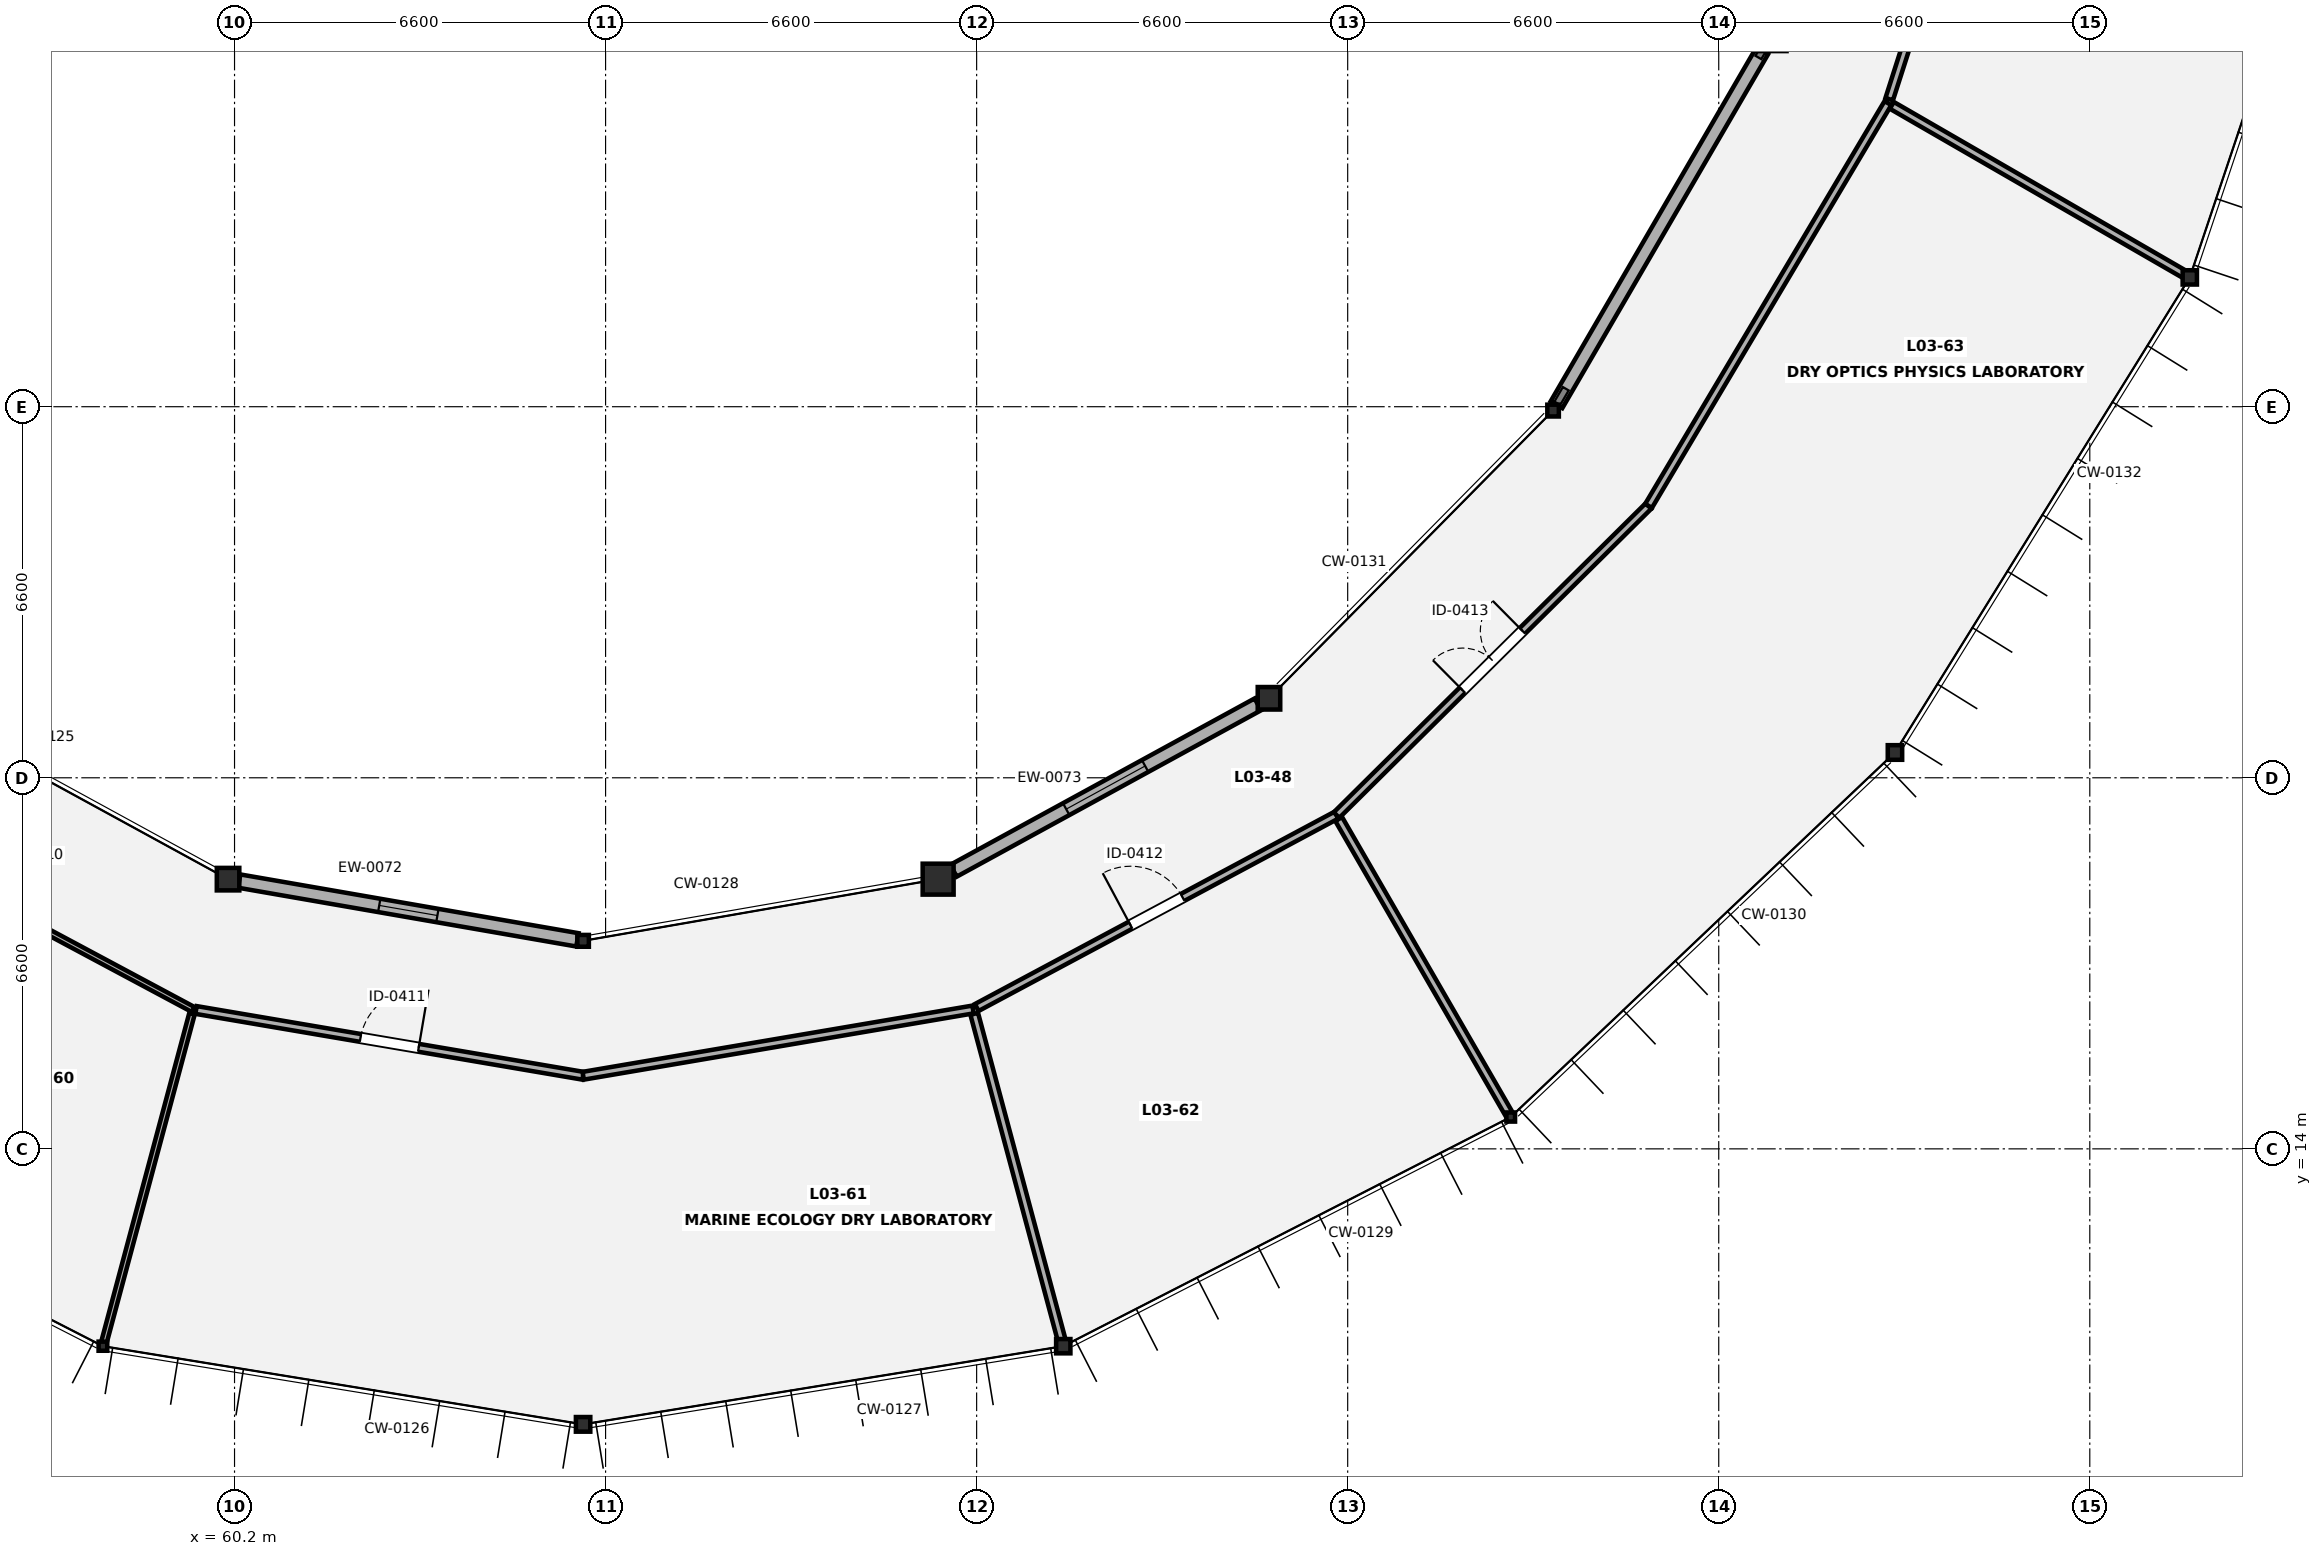
"""IFC4 building model, lengths in metres.
Left out: names, types, materials, properties, quantities, classifications, styles, units other than length and angle.
Written with IfcOpenShell. Run it as: python <this file> out.ifc"""

import sys

from ifc_helpers import new_model, si_unit, direction, frame, frame_2d, origin, origin_2d, place, context, subcontext, project, spatial, rectangle, i_section, extrude, element, fill, save


model = new_model("IFC4")
c1 = context("Model", 3, precision=1e-05, world=origin(), true_north=direction((0.0, 1.0)))
c2 = subcontext(c1, "Body", "Model", "MODEL_VIEW")
j1 = project(units=[si_unit("LENGTHUNIT", "METRE"), si_unit("PLANEANGLEUNIT", "RADIAN")], contexts=[c1])
p1 = place(None, origin())
s1 = spatial("IfcSite", under=j1, at=p1, CompositionType="ELEMENT")
p2 = place(p1, origin())
s2 = spatial("IfcBuilding", under=s1, at=p2, CompositionType="ELEMENT")
p3 = place(p2, frame((0.0, 0.0, 13.3)))
s3 = spatial("IfcBuildingStorey", under=s2, at=p3, CompositionType="ELEMENT", Elevation=13.3)
p4 = place(p3, frame((57.859, 10.49, 0.0), z_axis=(0.0, 0.0, 1.0), x_axis=(1.0, 0.0, 0.0)))
e1 = element("IfcColumn", 1, at=p4, inside=s3, PredefinedType="COLUMN", context=c2, shape_type="SweptSolid", body=[
    extrude(i_section(OverallWidth=0.154, OverallDepth=0.162, WebThickness=0.008, FlangeThickness=0.011, FilletRadius=0.009, at=origin_2d()), origin(), (0.0, 0.0, 1.0), 4.2),
])
p5 = place(p3, frame((60.085, 18.797, 0.0), z_axis=(0.0, 0.0, 1.0), x_axis=(1.0, 0.0, 0.0)))
e2 = element("IfcColumn", 2, at=p5, inside=s3, PredefinedType="PILASTER", context=c2, shape_type="SweptSolid", body=[
    extrude(rectangle(XDim=0.4, YDim=0.4, at=origin_2d()), origin(), (0.0, 0.0, 1.0), 4.2),
])
p6 = place(p3, frame((66.4, 9.1, 0.0), z_axis=(0.0, 0.0, 1.0), x_axis=(1.0, 0.0, 0.0)))
e3 = element("IfcColumn", 3, at=p6, inside=s3, PredefinedType="COLUMN", context=c2, shape_type="SweptSolid", body=[
    extrude(i_section(OverallWidth=0.256, OverallDepth=0.26, WebThickness=0.01, FlangeThickness=0.017, FilletRadius=0.014, at=origin_2d()), origin(), (0.0, 0.0, 1.0), 4.2),
])
p7 = place(p3, frame((66.4, 17.7, 0.0), z_axis=(0.0, 0.0, 1.0), x_axis=(1.0, 0.0, 0.0)))
e4 = element("IfcColumn", 4, at=p7, inside=s3, PredefinedType="COLUMN", context=c2, shape_type="SweptSolid", body=[
    extrude(i_section(OverallWidth=0.205, OverallDepth=0.21, WebThickness=0.009, FlangeThickness=0.014, FilletRadius=0.011, at=origin_2d()), origin(), (0.0, 0.0, 1.0), 4.2),
])
p8 = place(p3, frame((74.941, 10.49, 0.0), z_axis=(0.0, 0.0, 1.0), x_axis=(1.0, 0.0, 0.0)))
e5 = element("IfcColumn", 5, at=p8, inside=s3, PredefinedType="COLUMN", context=c2, shape_type="SweptSolid", body=[
    extrude(i_section(OverallWidth=0.254, OverallDepth=0.254, WebThickness=0.009, FlangeThickness=0.014, FilletRadius=0.014, at=origin_2d()), origin(), (0.0, 0.0, 1.0), 4.2),
])
p9 = place(p3, frame((72.715, 18.797, 0.0), z_axis=(0.0, 0.0, 1.0), x_axis=(1.0, 0.0, 0.0)))
e6 = element("IfcColumn", 6, at=p9, inside=s3, PredefinedType="COLUMN", context=c2, shape_type="SweptSolid", body=[
    extrude(rectangle(XDim=0.55, YDim=0.55, at=origin_2d()), origin(), (0.0, 0.0, 1.0), 4.2),
])
p10 = place(p3, frame((82.9, 14.566, 0.0), z_axis=(0.0, 0.0, 1.0), x_axis=(1.0, 0.0, 0.0)))
e7 = element("IfcColumn", 7, at=p10, inside=s3, PredefinedType="COLUMN", context=c2, shape_type="SweptSolid", body=[
    extrude(i_section(OverallWidth=0.154, OverallDepth=0.162, WebThickness=0.008, FlangeThickness=0.011, FilletRadius=0.009, at=origin_2d()), origin(), (0.0, 0.0, 1.0), 4.2),
])
p11 = place(p3, frame((78.6, 22.014, 0.0), z_axis=(0.0, 0.0, 1.0), x_axis=(1.0, 0.0, 0.0)))
e8 = element("IfcColumn", 8, at=p11, inside=s3, PredefinedType="PILASTER", context=c2, shape_type="SweptSolid", body=[
    extrude(rectangle(XDim=0.4, YDim=0.4, at=origin_2d()), origin(), (0.0, 0.0, 1.0), 4.2),
])
p12 = place(p3, frame((89.735, 21.05, 0.0), z_axis=(0.0, 0.0, 1.0), x_axis=(1.0, 0.0, 0.0)))
e9 = element("IfcColumn", 9, at=p12, inside=s3, PredefinedType="COLUMN", context=c2, shape_type="SweptSolid", body=[
    extrude(i_section(OverallWidth=0.256, OverallDepth=0.26, WebThickness=0.01, FlangeThickness=0.017, FilletRadius=0.014, at=origin_2d()), origin(), (0.0, 0.0, 1.0), 4.2),
])
p13 = place(p3, frame((83.653, 27.131, 0.0), z_axis=(0.0, 0.0, 1.0), x_axis=(1.0, 0.0, 0.0)))
e10 = element("IfcColumn", 10, at=p13, inside=s3, PredefinedType="COLUMN", context=c2, shape_type="SweptSolid", body=[
    extrude(i_section(OverallWidth=0.205, OverallDepth=0.21, WebThickness=0.009, FlangeThickness=0.014, FilletRadius=0.011, at=origin_2d()), origin(), (0.0, 0.0, 1.0), 4.2),
])
p14 = place(p3, frame((94.979, 29.5, 0.0), z_axis=(0.0, 0.0, 1.0), x_axis=(1.0, 0.0, 0.0)))
e11 = element("IfcColumn", 11, at=p14, inside=s3, PredefinedType="COLUMN", context=c2, shape_type="SweptSolid", body=[
    extrude(i_section(OverallWidth=0.254, OverallDepth=0.254, WebThickness=0.009, FlangeThickness=0.014, FilletRadius=0.014, at=origin_2d()), origin(), (0.0, 0.0, 1.0), 4.2),
])
p15 = place(p3, frame((60.283, 18.763, 0.0), z_axis=(0.0, 0.0, 1.0), x_axis=(0.985246064368, -0.171143777706, 0.0)))
e12 = element("IfcWall", 12, at=p15, inside=s3, PredefinedType="SOLIDWALL", context=c2, shape_type="SweptSolid", body=[
    extrude(rectangle(XDim=6.107, YDim=0.24, at=frame_2d((3.053, 0.0))), origin(), (0.0, 0.0, 1.0), 3.65),
])
p16 = place(p15, frame((2.528, 0.0, 0.85)))
e13 = element("IfcOpeningElement", 13, at=p16, cuts=e12, PredefinedType="OPENING", context=c2, shape_type="SweptSolid", body=[
    extrude(rectangle(XDim=1.05, YDim=1.35, at=frame_2d((0.525, 0.675))), frame((0.0, 0.13, 0.0), z_axis=(0.0, -1.0, 0.0), x_axis=(1.0, 0.0, 0.0)), (0.0, 0.0, 1.0), 0.26),
])
p17 = place(p3, frame((72.988, 18.947, 0.0), z_axis=(0.0, 0.0, 1.0), x_axis=(0.877477839064, 0.479617182712, 0.0)))
e14 = element("IfcWall", 14, at=p17, inside=s3, PredefinedType="SOLIDWALL", context=c2, shape_type="SweptSolid", body=[
    extrude(rectangle(XDim=6.169, YDim=0.24, at=frame_2d((3.085, 0.0))), origin(), (0.0, 0.0, 1.0), 3.65),
])
p18 = place(p17, frame((2.285, 0.0, 0.85)))
e15 = element("IfcOpeningElement", 15, at=p18, cuts=e14, PredefinedType="OPENING", context=c2, shape_type="SweptSolid", body=[
    extrude(rectangle(XDim=1.6, YDim=1.5, at=frame_2d((0.8, 0.75))), frame((0.0, 0.13, 0.0), z_axis=(0.0, -1.0, 0.0), x_axis=(1.0, 0.0, 0.0)), (0.0, 0.0, 1.0), 0.26),
])
p19 = place(p3, frame((83.713, 27.235, 0.0), z_axis=(0.0, 0.0, 1.0), x_axis=(0.502677590803, 0.864473967048, 0.0)))
e16 = element("IfcWall", 16, at=p19, inside=s3, PredefinedType="SOLIDWALL", context=c2, shape_type="SweptSolid", body=[
    extrude(rectangle(XDim=7.278, YDim=0.24, at=frame_2d((3.639, 0.0))), origin(), (0.0, 0.0, 1.0), 3.65),
])
p20 = place(p3, frame((53.063, 19.902, 0.0), z_axis=(0.0, 0.0, 1.0), x_axis=(0.881826283139, -0.471574391125, 0.0)))
e17 = element("IfcWall", 17, at=p20, inside=s3, PredefinedType="PARTITIONING", context=c2, shape_type="SweptSolid", body=[
    extrude(rectangle(XDim=7.258, YDim=0.1, at=frame_2d((3.629, 0.0))), origin(), (0.0, 0.0, 1.0), 3.98),
])
p21 = place(p20, frame((3.129, 0.0, 0.0)))
e18 = element("IfcOpeningElement", 18, at=p21, cuts=e17, PredefinedType="OPENING", context=c2, shape_type="SweptSolid", body=[
    extrude(rectangle(XDim=1.0, YDim=2.1, at=frame_2d((0.5, 1.05))), frame((0.0, 0.06, 0.0), z_axis=(0.0, -1.0, 0.0), x_axis=(1.0, 0.0, 0.0)), (0.0, 0.0, 1.0), 0.12),
])
p22 = place(p3, frame((59.443, 16.402, 0.0), z_axis=(0.0, 0.0, 1.0), x_axis=(-0.258805895167, -0.965929349708, 0.0)))
e19 = element("IfcWall", 19, at=p22, inside=s3, PredefinedType="PARTITIONING", context=c2, shape_type="SweptSolid", body=[
    extrude(rectangle(XDim=6.06, YDim=0.1, at=frame_2d((3.03, 0.0))), origin(), (0.0, 0.0, 1.0), 3.323),
])
p23 = place(p3, frame((59.515, 16.47, 0.0), z_axis=(0.0, 0.0, 1.0), x_axis=(0.985861622289, -0.167561516157, 0.0)))
e20 = element("IfcWall", 20, at=p23, inside=s3, PredefinedType="PARTITIONING", context=c2, shape_type="SweptSolid", body=[
    extrude(rectangle(XDim=6.983, YDim=0.14, at=frame_2d((3.492, 0.0))), origin(), (0.0, 0.0, 1.0), 3.98),
])
p24 = place(p23, frame((2.967, 0.0, 0.0)))
e21 = element("IfcOpeningElement", 21, at=p24, cuts=e20, PredefinedType="OPENING", context=c2, shape_type="SweptSolid", body=[
    extrude(rectangle(XDim=1.05, YDim=2.15, at=frame_2d((0.525, 1.075))), frame((0.0, 0.08, 0.0), z_axis=(0.0, -1.0, 0.0), x_axis=(1.0, 0.0, 0.0)), (0.0, 0.0, 1.0), 0.16),
])
p25 = place(p3, frame((66.402, 15.3, 0.0), z_axis=(0.0, 0.0, 1.0), x_axis=(0.985858771321, 0.167578289193, 0.0)))
e22 = element("IfcWall", 22, at=p25, inside=s3, PredefinedType="PARTITIONING", context=c2, shape_type="SweptSolid", body=[
    extrude(rectangle(XDim=7.034, YDim=0.14, at=frame_2d((3.517, 0.0))), origin(), (0.0, 0.0, 1.0), 3.98),
])
p26 = place(p3, frame((73.357, 16.402, 0.0), z_axis=(0.0, 0.0, 1.0), x_axis=(0.258805895167, -0.965929349708, 0.0)))
e23 = element("IfcWall", 23, at=p26, inside=s3, PredefinedType="PARTITIONING", context=c2, shape_type="SweptSolid", body=[
    extrude(rectangle(XDim=6.06, YDim=0.14, at=frame_2d((3.03, 0.0))), origin(), (0.0, 0.0, 1.0), 3.465),
])
p27 = place(p3, frame((73.402, 16.514, 0.0), z_axis=(0.0, 0.0, 1.0), x_axis=(0.881829873621, 0.471567676999, 0.0)))
e24 = element("IfcWall", 24, at=p27, inside=s3, PredefinedType="PARTITIONING", context=c2, shape_type="SweptSolid", body=[
    extrude(rectangle(XDim=7.256, YDim=0.14, at=frame_2d((3.628, 0.0))), origin(), (0.0, 0.0, 1.0), 3.98),
])
p28 = place(p27, frame((3.103, 0.0, 0.0)))
e25 = element("IfcOpeningElement", 25, at=p28, cuts=e24, PredefinedType="OPENING", context=c2, shape_type="SweptSolid", body=[
    extrude(rectangle(XDim=1.05, YDim=2.15, at=frame_2d((0.525, 1.075))), frame((0.0, 0.08, 0.0), z_axis=(0.0, -1.0, 0.0), x_axis=(1.0, 0.0, 0.0)), (0.0, 0.0, 1.0), 0.16),
])
p29 = place(p3, frame((79.84, 19.866, 0.0), z_axis=(0.0, 0.0, 1.0), x_axis=(0.500008418462, -0.866020543329, 0.0)))
e26 = element("IfcWall", 26, at=p29, inside=s3, PredefinedType="PARTITIONING", context=c2, shape_type="SweptSolid", body=[
    extrude(rectangle(XDim=6.06, YDim=0.14, at=frame_2d((3.03, 0.0))), origin(), (0.0, 0.0, 1.0), 3.313),
])
p30 = place(p3, frame((79.802, 19.937, 0.0), z_axis=(0.0, 0.0, 1.0), x_axis=(0.710427757183, 0.703770134222, 0.0)))
e27 = element("IfcWall", 27, at=p30, inside=s3, PredefinedType="PARTITIONING", context=c2, shape_type="SweptSolid", body=[
    extrude(rectangle(XDim=7.811, YDim=0.14, at=frame_2d((3.905, 0.0))), origin(), (0.0, 0.0, 1.0), 3.98),
])
p31 = place(p30, frame((3.156, 0.0, 0.0)))
e28 = element("IfcOpeningElement", 28, at=p31, cuts=e27, PredefinedType="OPENING", context=c2, shape_type="SweptSolid", body=[
    extrude(rectangle(XDim=1.5, YDim=2.15, at=frame_2d((0.75, 1.075))), frame((0.0, 0.08, 0.0), z_axis=(0.0, -1.0, 0.0), x_axis=(1.0, 0.0, 0.0)), (0.0, 0.0, 1.0), 0.16),
])
p32 = place(p3, frame((85.352, 25.436, 0.0), z_axis=(0.0, 0.0, 1.0), x_axis=(0.510915698067, 0.859630821614, 0.0)))
e29 = element("IfcWall", 29, at=p32, inside=s3, PredefinedType="PARTITIONING", context=c2, shape_type="SweptSolid", body=[
    extrude(rectangle(XDim=8.334, YDim=0.14, at=frame_2d((4.167, 0.0))), origin(), (0.0, 0.0, 1.0), 3.98),
])
p33 = place(p3, frame((89.679, 32.56, 0.0), z_axis=(0.0, 0.0, 1.0), x_axis=(0.866020543329, -0.500008418462, 0.0)))
e30 = element("IfcWall", 30, at=p33, inside=s3, PredefinedType="PARTITIONING", context=c2, shape_type="SweptSolid", body=[
    extrude(rectangle(XDim=6.06, YDim=0.14, at=frame_2d((3.03, 0.0))), origin(), (0.0, 0.0, 1.0), 3.471),
])
p34 = place(p3, frame((89.632, 32.67, 0.0), z_axis=(0.0, 0.0, 1.0), x_axis=(0.305495322231, 0.952193577008, 0.0)))
e31 = element("IfcWall", 31, at=p34, inside=s3, PredefinedType="PARTITIONING", context=c2, shape_type="SweptSolid", body=[
    extrude(rectangle(XDim=8.69, YDim=0.14, at=frame_2d((4.345, 0.0))), origin(), (0.0, 0.0, 1.0), 3.98),
])
p35 = place(p34, frame((3.82, 0.0, 0.0)))
e32 = element("IfcOpeningElement", 32, at=p35, cuts=e31, PredefinedType="OPENING", context=c2, shape_type="SweptSolid", body=[
    extrude(rectangle(XDim=1.05, YDim=2.15, at=frame_2d((0.525, 1.075))), frame((0.0, 0.08, 0.0), z_axis=(0.0, -1.0, 0.0), x_axis=(1.0, 0.0, 0.0)), (0.0, 0.0, 1.0), 0.16),
])
p36 = place(p16, origin())
e33 = element("IfcWindow", 33, at=p36, inside=s3, PartitioningType="SINGLE_PANEL", PredefinedType="WINDOW", context=c2, shape_type="SweptSolid", body=[
    extrude(rectangle(XDim=1.05, YDim=1.35, at=frame_2d((0.525, 0.675))), frame((0.0, 0.03, 0.0), z_axis=(0.0, -1.0, 0.0), x_axis=(1.0, 0.0, 0.0)), (0.0, 0.0, 1.0), 0.06),
])
fill(e13, e33)
p37 = place(p18, origin())
e34 = element("IfcWindow", 34, at=p37, inside=s3, PartitioningType="SINGLE_PANEL", PredefinedType="WINDOW", context=c2, shape_type="SweptSolid", body=[
    extrude(rectangle(XDim=1.6, YDim=1.5, at=frame_2d((0.8, 0.75))), frame((0.0, 0.03, 0.0), z_axis=(0.0, -1.0, 0.0), x_axis=(1.0, 0.0, 0.0)), (0.0, 0.0, 1.0), 0.06),
])
fill(e15, e34)
p38 = place(p24, origin())
e35 = element("IfcDoor", 35, at=p38, inside=s3, OperationType="SINGLE_SWING_RIGHT", PredefinedType="DOOR", context=c2, shape_type="SweptSolid", body=[
    extrude(rectangle(XDim=1.05, YDim=2.15, at=frame_2d((0.525, 1.075))), frame((0.0, 0.025, 0.0), z_axis=(0.0, -1.0, 0.0), x_axis=(1.0, 0.0, 0.0)), (0.0, 0.0, 1.0), 0.05),
])
fill(e21, e35)
p39 = place(p28, origin())
e36 = element("IfcDoor", 36, at=p39, inside=s3, OperationType="SINGLE_SWING_LEFT", PredefinedType="DOOR", context=c2, shape_type="SweptSolid", body=[
    extrude(rectangle(XDim=1.05, YDim=2.15, at=frame_2d((0.525, 1.075))), frame((0.0, 0.025, 0.0), z_axis=(0.0, -1.0, 0.0), x_axis=(1.0, 0.0, 0.0)), (0.0, 0.0, 1.0), 0.05),
])
fill(e25, e36)
p40 = place(p31, origin())
e37 = element("IfcDoor", 37, at=p40, inside=s3, OperationType="DOUBLE_DOOR_SINGLE_SWING", PredefinedType="DOOR", context=c2, shape_type="SweptSolid", body=[
    extrude(rectangle(XDim=1.5, YDim=2.15, at=frame_2d((0.75, 1.075))), frame((0.0, 0.025, 0.0), z_axis=(0.0, -1.0, 0.0), x_axis=(1.0, 0.0, 0.0)), (0.0, 0.0, 1.0), 0.05),
])
fill(e28, e37)
save(model, sys.argv[1])
